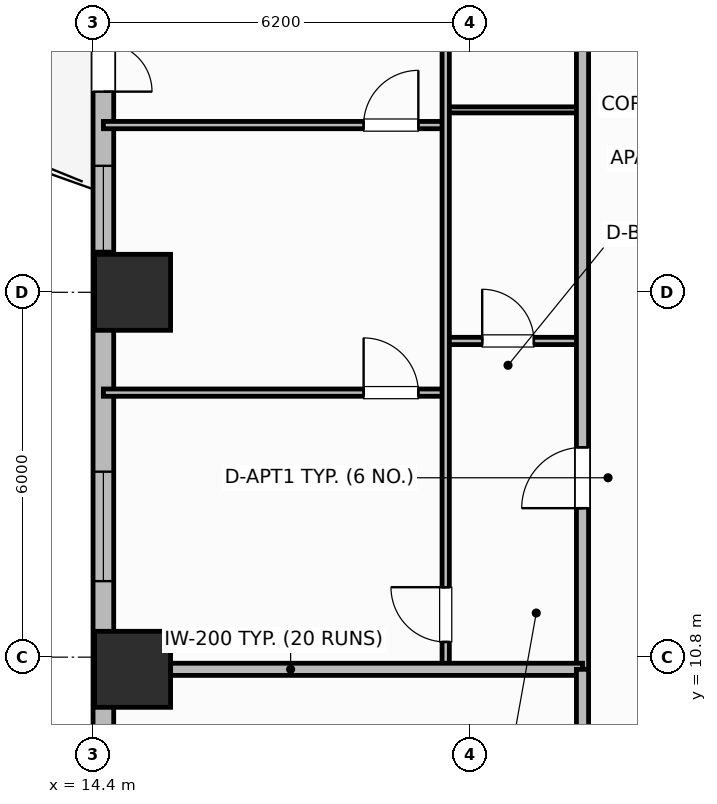
"""IFC4 building model, lengths in metres.
Left out: names, types, materials, properties, quantities, classifications, styles, units other than length and angle.
Written with IfcOpenShell. Run it as: python <this file> out.ifc"""

import sys

from ifc_helpers import new_model, si_unit, direction, frame, frame_2d, origin, origin_2d, place, context, subcontext, project, spatial, rectangle, extrude, element, fill, save


model = new_model("IFC4")
c1 = context("Model", 3, precision=1e-05, world=origin(), true_north=direction((0.0, 1.0)))
c2 = subcontext(c1, "Body", "Model", "MODEL_VIEW")
j1 = project(units=[si_unit("LENGTHUNIT", "METRE"), si_unit("PLANEANGLEUNIT", "RADIAN")], contexts=[c1])
p1 = place(None, origin())
s1 = spatial("IfcSite", under=j1, at=p1, CompositionType="ELEMENT")
p2 = place(p1, origin())
s2 = spatial("IfcBuilding", under=s1, at=p2, CompositionType="ELEMENT")
p3 = place(p2, frame((0.0, 0.0, 62.1)))
s3 = spatial("IfcBuildingStorey", under=s2, at=p3, CompositionType="ELEMENT", Elevation=62.1)
for number, where, z_axis, x_axis in (
    (1, (15.05, 10.6, 0.0), (0.0, 0.0, 1.0), (1.0, 0.0, 0.0)),
    (2, (15.05, 16.8, 0.0), (0.0, 0.0, 1.0), (1.0, 0.0, 0.0)),
):
    element("IfcColumn", number, at=place(p3, frame(where, z_axis=z_axis, x_axis=x_axis)), inside=s3, PredefinedType="COLUMN", context=c2, shape_type="SweptSolid", body=[
        extrude(rectangle(XDim=1.25, YDim=1.25, at=origin_2d()), origin(), (0.0, 0.0, 1.0), 3.7),
    ])
p4 = place(p3, frame((14.57, 23.8, 0.0), z_axis=(0.0, 0.0, 1.0), x_axis=(0.0, -1.0, 0.0)))
e3 = element("IfcWall", 3, at=p4, inside=s3, PredefinedType="SOLIDWALL", context=c2, shape_type="SweptSolid", body=[
    extrude(rectangle(XDim=14.8, YDim=0.34, at=frame_2d((7.4, 0.0))), origin(), (0.0, 0.0, 1.0), 2.7),
])
p5 = place(p4, frame((2.1, 0.0, 0.0)))
e4 = element("IfcOpeningElement", 4, at=p5, cuts=e3, PredefinedType="OPENING", context=c2, shape_type="SweptSolid", body=[
    extrude(rectangle(XDim=1.6, YDim=2.1, at=frame_2d((0.8, 1.05))), frame((0.0, 0.18, 0.0), z_axis=(0.0, -1.0, 0.0), x_axis=(1.0, 0.0, 0.0)), (0.0, 0.0, 1.0), 0.36),
])
p6 = place(p4, frame((4.92, 0.0, 0.69)))
e5 = element("IfcOpeningElement", 5, at=p6, cuts=e3, PredefinedType="OPENING", context=c2, shape_type="SweptSolid", body=[
    extrude(rectangle(XDim=1.4, YDim=1.85, at=frame_2d((0.7, 0.925))), frame((0.0, 0.18, 0.0), z_axis=(0.0, -1.0, 0.0), x_axis=(1.0, 0.0, 0.0)), (0.0, 0.0, 1.0), 0.36),
])
p7 = place(p4, frame((9.95, 0.0, 0.73)))
e6 = element("IfcOpeningElement", 6, at=p7, cuts=e3, PredefinedType="OPENING", context=c2, shape_type="SweptSolid", body=[
    extrude(rectangle(XDim=1.8, YDim=1.85, at=frame_2d((0.9, 0.925))), frame((0.0, 0.18, 0.0), z_axis=(0.0, -1.0, 0.0), x_axis=(1.0, 0.0, 0.0)), (0.0, 0.0, 1.0), 0.36),
])
p8 = place(p3, frame((20.2, 16.0, 0.0), z_axis=(0.0, 0.0, 1.0), x_axis=(1.0, 0.0, 0.0)))
e7 = element("IfcWall", 7, at=p8, inside=s3, PredefinedType="PARTITIONING", context=c2, shape_type="SweptSolid", body=[
    extrude(rectangle(XDim=2.25, YDim=0.12, at=frame_2d((1.125, 0.0))), origin(), (0.0, 0.0, 1.0), 2.53),
])
p9 = place(p8, frame((0.6, 0.0, 0.0)))
e8 = element("IfcOpeningElement", 8, at=p9, cuts=e7, PredefinedType="OPENING", context=c2, shape_type="SweptSolid", body=[
    extrude(rectangle(XDim=0.85, YDim=2.1, at=frame_2d((0.425, 1.05))), frame((0.0, 0.07, 0.0), z_axis=(0.0, -1.0, 0.0), x_axis=(1.0, 0.0, 0.0)), (0.0, 0.0, 1.0), 0.14),
])
p10 = place(p3, frame((20.2, 19.8, 0.0), z_axis=(0.0, 0.0, 1.0), x_axis=(1.0, 0.0, 0.0)))
e9 = element("IfcWall", 9, at=p10, inside=s3, PredefinedType="PARTITIONING", context=c2, shape_type="SweptSolid", body=[
    extrude(rectangle(XDim=2.25, YDim=0.1, at=frame_2d((1.125, 0.0))), origin(), (0.0, 0.0, 1.0), 2.53),
])
p11 = place(p3, frame((14.57, 15.15, 0.0), z_axis=(0.0, 0.0, 1.0), x_axis=(1.0, 0.0, 0.0)))
e10 = element("IfcWall", 10, at=p11, inside=s3, PredefinedType="PARTITIONING", context=c2, shape_type="SweptSolid", body=[
    extrude(rectangle(XDim=5.63, YDim=0.12, at=frame_2d((2.815, 0.0))), origin(), (0.0, 0.0, 1.0), 2.53),
])
p12 = place(p11, frame((4.28, 0.0, 0.0)))
e11 = element("IfcOpeningElement", 11, at=p12, cuts=e10, PredefinedType="OPENING", context=c2, shape_type="SweptSolid", body=[
    extrude(rectangle(XDim=0.9, YDim=2.1, at=frame_2d((0.45, 1.05))), frame((0.0, 0.07, 0.0), z_axis=(0.0, -1.0, 0.0), x_axis=(1.0, 0.0, 0.0)), (0.0, 0.0, 1.0), 0.14),
])
p13 = place(p3, frame((14.57, 19.55, 0.0), z_axis=(0.0, 0.0, 1.0), x_axis=(1.0, 0.0, 0.0)))
e12 = element("IfcWall", 12, at=p13, inside=s3, PredefinedType="PARTITIONING", context=c2, shape_type="SweptSolid", body=[
    extrude(rectangle(XDim=5.63, YDim=0.12, at=frame_2d((2.815, 0.0))), origin(), (0.0, 0.0, 1.0), 2.53),
])
p14 = place(p13, frame((4.28, 0.0, 0.0)))
e13 = element("IfcOpeningElement", 13, at=p14, cuts=e12, PredefinedType="OPENING", context=c2, shape_type="SweptSolid", body=[
    extrude(rectangle(XDim=0.9, YDim=2.1, at=frame_2d((0.45, 1.05))), frame((0.0, 0.07, 0.0), z_axis=(0.0, -1.0, 0.0), x_axis=(1.0, 0.0, 0.0)), (0.0, 0.0, 1.0), 0.14),
])
p15 = place(p3, frame((20.2, 10.64, 0.0), z_axis=(0.0, 0.0, 1.0), x_axis=(0.0, 1.0, 0.0)))
e14 = element("IfcWall", 14, at=p15, inside=s3, PredefinedType="PARTITIONING", context=c2, shape_type="SweptSolid", body=[
    extrude(rectangle(XDim=15.408, YDim=0.12, at=frame_2d((7.704, 0.0))), origin(), (0.0, 0.0, 1.0), 2.53),
])
p16 = place(p15, frame((0.41, 0.0, 0.0)))
e15 = element("IfcOpeningElement", 15, at=p16, cuts=e14, PredefinedType="OPENING", context=c2, shape_type="SweptSolid", body=[
    extrude(rectangle(XDim=0.9, YDim=2.1, at=frame_2d((0.45, 1.05))), frame((0.0, 0.07, 0.0), z_axis=(0.0, -1.0, 0.0), x_axis=(1.0, 0.0, 0.0)), (0.0, 0.0, 1.0), 0.14),
])
p17 = place(p15, frame((11.879, 0.0, 0.0)))
e16 = element("IfcOpeningElement", 16, at=p17, cuts=e14, PredefinedType="OPENING", context=c2, shape_type="SweptSolid", body=[
    extrude(rectangle(XDim=0.82, YDim=2.08, at=frame_2d((0.41, 1.04))), frame((0.0, 0.07, 0.0), z_axis=(0.0, -1.0, 0.0), x_axis=(1.0, 0.0, 0.0)), (0.0, 0.0, 1.0), 0.14),
])
p18 = place(p3, frame((22.45, 10.6, 0.0), z_axis=(0.0, 0.0, 1.0), x_axis=(0.0, 1.0, 0.0)))
e17 = element("IfcWall", 17, at=p18, inside=s3, PredefinedType="PARTITIONING", context=c2, shape_type="SweptSolid", body=[
    extrude(rectangle(XDim=35.2, YDim=0.2, at=frame_2d((17.6, 0.0))), origin(), (0.0, 0.0, 1.0), 2.53),
])
p19 = place(p18, frame((2.65, 0.0, 0.0)))
e18 = element("IfcOpeningElement", 18, at=p19, cuts=e17, PredefinedType="OPENING", context=c2, shape_type="SweptSolid", body=[
    extrude(rectangle(XDim=1.0, YDim=2.15, at=frame_2d((0.5, 1.075))), frame((0.0, 0.11, 0.0), z_axis=(0.0, -1.0, 0.0), x_axis=(1.0, 0.0, 0.0)), (0.0, 0.0, 1.0), 0.22),
])
p20 = place(p18, frame((19.438, 0.0, 0.0)))
e19 = element("IfcOpeningElement", 19, at=p20, cuts=e17, PredefinedType="OPENING", context=c2, shape_type="SweptSolid", body=[
    extrude(rectangle(XDim=1.0, YDim=2.15, at=frame_2d((0.5, 1.075))), frame((0.0, 0.11, 0.0), z_axis=(0.0, -1.0, 0.0), x_axis=(1.0, 0.0, 0.0)), (0.0, 0.0, 1.0), 0.22),
])
p21 = place(p3, frame((14.99, 10.6, 0.0), z_axis=(0.0, 0.0, 1.0), x_axis=(1.0, 0.0, 0.0)))
e20 = element("IfcWall", 20, at=p21, inside=s3, PredefinedType="PARTITIONING", context=c2, shape_type="SweptSolid", body=[
    extrude(rectangle(XDim=7.46, YDim=0.2, at=frame_2d((3.73, 0.0))), origin(), (0.0, 0.0, 1.0), 2.53),
])
p22 = place(p3, frame((22.45, 4.97, 0.0), z_axis=(0.0, 0.0, 1.0), x_axis=(0.0, 1.0, 0.0)))
e21 = element("IfcWall", 21, at=p22, inside=s3, PredefinedType="PARTITIONING", context=c2, shape_type="SweptSolid", body=[
    extrude(rectangle(XDim=5.63, YDim=0.2, at=frame_2d((2.815, 0.0))), origin(), (0.0, 0.0, 1.0), 2.53),
])
p23 = place(p5, origin())
e22 = element("IfcDoor", 22, at=p23, inside=s3, OperationType="DOUBLE_DOOR_SINGLE_SWING", PredefinedType="DOOR", context=c2, shape_type="SweptSolid", body=[
    extrude(rectangle(XDim=1.6, YDim=2.1, at=frame_2d((0.8, 1.05))), frame((0.0, 0.025, 0.0), z_axis=(0.0, -1.0, 0.0), x_axis=(1.0, 0.0, 0.0)), (0.0, 0.0, 1.0), 0.05),
])
fill(e4, e22)
p24 = place(p6, origin())
e23 = element("IfcWindow", 23, at=p24, inside=s3, PartitioningType="SINGLE_PANEL", PredefinedType="WINDOW", context=c2, shape_type="SweptSolid", body=[
    extrude(rectangle(XDim=1.4, YDim=1.85, at=frame_2d((0.7, 0.925))), frame((0.0, 0.03, 0.0), z_axis=(0.0, -1.0, 0.0), x_axis=(1.0, 0.0, 0.0)), (0.0, 0.0, 1.0), 0.06),
])
fill(e5, e23)
p25 = place(p7, origin())
e24 = element("IfcWindow", 24, at=p25, inside=s3, PartitioningType="SINGLE_PANEL", PredefinedType="WINDOW", context=c2, shape_type="SweptSolid", body=[
    extrude(rectangle(XDim=1.8, YDim=1.85, at=frame_2d((0.9, 0.925))), frame((0.0, 0.03, 0.0), z_axis=(0.0, -1.0, 0.0), x_axis=(1.0, 0.0, 0.0)), (0.0, 0.0, 1.0), 0.06),
])
fill(e6, e24)
p26 = place(p9, origin())
e25 = element("IfcDoor", 25, at=p26, inside=s3, OperationType="SINGLE_SWING_LEFT", PredefinedType="DOOR", context=c2, shape_type="SweptSolid", body=[
    extrude(rectangle(XDim=0.85, YDim=2.1, at=frame_2d((0.425, 1.05))), frame((0.0, 0.025, 0.0), z_axis=(0.0, -1.0, 0.0), x_axis=(1.0, 0.0, 0.0)), (0.0, 0.0, 1.0), 0.05),
])
fill(e8, e25)
p27 = place(p12, origin())
e26 = element("IfcDoor", 26, at=p27, inside=s3, OperationType="SINGLE_SWING_LEFT", PredefinedType="DOOR", context=c2, shape_type="SweptSolid", body=[
    extrude(rectangle(XDim=0.9, YDim=2.1, at=frame_2d((0.45, 1.05))), frame((0.0, 0.025, 0.0), z_axis=(0.0, -1.0, 0.0), x_axis=(1.0, 0.0, 0.0)), (0.0, 0.0, 1.0), 0.05),
])
fill(e11, e26)
p28 = place(p14, origin())
e27 = element("IfcDoor", 27, at=p28, inside=s3, OperationType="SINGLE_SWING_RIGHT", PredefinedType="DOOR", context=c2, shape_type="SweptSolid", body=[
    extrude(rectangle(XDim=0.9, YDim=2.1, at=frame_2d((0.45, 1.05))), frame((0.0, 0.025, 0.0), z_axis=(0.0, -1.0, 0.0), x_axis=(1.0, 0.0, 0.0)), (0.0, 0.0, 1.0), 0.05),
])
fill(e13, e27)
p29 = place(p16, origin())
e28 = element("IfcDoor", 28, at=p29, inside=s3, OperationType="SINGLE_SWING_RIGHT", PredefinedType="DOOR", context=c2, shape_type="SweptSolid", body=[
    extrude(rectangle(XDim=0.9, YDim=2.1, at=frame_2d((0.45, 1.05))), frame((0.0, 0.025, 0.0), z_axis=(0.0, -1.0, 0.0), x_axis=(1.0, 0.0, 0.0)), (0.0, 0.0, 1.0), 0.05),
])
fill(e15, e28)
p30 = place(p19, origin())
e29 = element("IfcDoor", 29, at=p30, inside=s3, OperationType="SINGLE_SWING_LEFT", PredefinedType="DOOR", context=c2, shape_type="SweptSolid", body=[
    extrude(rectangle(XDim=1.0, YDim=2.15, at=frame_2d((0.5, 1.075))), frame((0.0, 0.025, 0.0), z_axis=(0.0, -1.0, 0.0), x_axis=(1.0, 0.0, 0.0)), (0.0, 0.0, 1.0), 0.05),
])
fill(e18, e29)
save(model, sys.argv[1])
